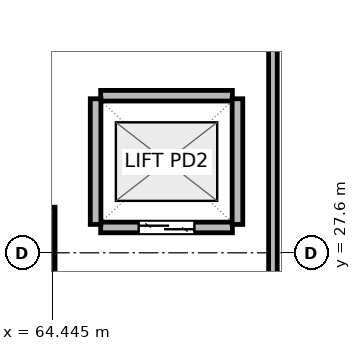
"""IFC4 building model, lengths in metres.
Left out: names, types, materials, properties, quantities, classifications, styles, units other than length and angle.
Written with IfcOpenShell. Run it as: python <this file> out.ifc"""

import sys

from ifc_helpers import new_model, si_unit, direction, frame, frame_2d, origin, origin_2d, place, context, subcontext, project, spatial, rectangle, extrude, element, fill, save


model = new_model("IFC4")
c1 = context("Model", 3, precision=1e-05, world=origin(), true_north=direction((0.0, 1.0)))
c2 = subcontext(c1, "Body", "Model", "MODEL_VIEW")
j1 = project(units=[si_unit("LENGTHUNIT", "METRE"), si_unit("PLANEANGLEUNIT", "RADIAN")], contexts=[c1])
p1 = place(None, origin())
s1 = spatial("IfcSite", under=j1, at=p1, CompositionType="ELEMENT")
p2 = place(p1, origin())
s2 = spatial("IfcBuilding", under=s1, at=p2, CompositionType="ELEMENT")
p3 = place(p2, frame((0.0, 0.0, 12.9)))
s3 = spatial("IfcBuildingStorey", under=s2, at=p3, CompositionType="ELEMENT", Elevation=12.9)
p4 = place(p3, frame((63.6, 27.6, 0.0), z_axis=(0.0, 0.0, 1.0), x_axis=(1.0, 0.0, 0.0)))
e1 = element("IfcColumn", 1, at=p4, inside=s3, PredefinedType="COLUMN", context=c2, shape_type="SweptSolid", body=[
    extrude(rectangle(XDim=1.8, YDim=1.8, at=origin_2d()), origin(), (0.0, 0.0, 1.0), 4.2),
])
p5 = place(p3, frame((65.4, 28.1, 0.0), z_axis=(0.0, 0.0, 1.0), x_axis=(1.0, 0.0, 0.0)))
e2 = element("IfcWall", 2, at=p5, inside=s3, PredefinedType="PARTITIONING", context=c2, shape_type="SweptSolid", body=[
    extrude(rectangle(XDim=2.6, YDim=0.21, at=frame_2d((1.3, 0.0))), origin(), (0.0, 0.0, 1.0), 3.84),
])
p6 = place(p5, frame((0.75, 0.0, 0.0)))
e3 = element("IfcOpeningElement", 3, at=p6, cuts=e2, PredefinedType="OPENING", context=c2, shape_type="SweptSolid", body=[
    extrude(rectangle(XDim=1.1, YDim=2.04, at=frame_2d((0.55, 1.02))), frame((0.0, 0.115, 0.0), z_axis=(0.0, -1.0, 0.0), x_axis=(1.0, 0.0, 0.0)), (0.0, 0.0, 1.0), 0.23),
])
p7 = place(p3, frame((65.4, 30.7, 0.0), z_axis=(0.0, 0.0, 1.0), x_axis=(1.0, 0.0, 0.0)))
e4 = element("IfcWall", 4, at=p7, inside=s3, PredefinedType="PARTITIONING", context=c2, shape_type="SweptSolid", body=[
    extrude(rectangle(XDim=2.6, YDim=0.21, at=frame_2d((1.3, 0.0))), origin(), (0.0, 0.0, 1.0), 3.84),
])
for number, where, z_axis, x_axis in (
    (5, (65.3, 28.16, 0.0), (0.0, 0.0, 1.0), (0.0, 1.0, 0.0)),
    (6, (68.1, 28.16, 0.0), (0.0, 0.0, 1.0), (0.0, 1.0, 0.0)),
):
    element("IfcWall", number, at=place(p3, frame(where, z_axis=z_axis, x_axis=x_axis)), inside=s3, PredefinedType="PARTITIONING", context=c2, shape_type="SweptSolid", body=[
        extrude(rectangle(XDim=2.48, YDim=0.21, at=frame_2d((1.24, 0.0))), origin(), (0.0, 0.0, 1.0), 3.84),
    ])
p8 = place(p3, frame((68.8, 25.187, 0.0), z_axis=(0.0, 0.0, 1.0), x_axis=(0.0, 1.0, 0.0)))
e7 = element("IfcWall", 7, at=p8, inside=s3, PredefinedType="PARTITIONING", context=c2, shape_type="SweptSolid", body=[
    extrude(rectangle(XDim=46.448, YDim=0.17, at=frame_2d((23.224, 0.0))), origin(), (0.0, 0.0, 1.0), 3.84),
])
p9 = place(p8, frame((15.913, 0.0, 0.0)))
e8 = element("IfcOpeningElement", 8, at=p9, cuts=e7, PredefinedType="OPENING", context=c2, shape_type="SweptSolid", body=[
    extrude(rectangle(XDim=1.1, YDim=2.05, at=frame_2d((0.55, 1.025))), frame((0.0, 0.095, 0.0), z_axis=(0.0, -1.0, 0.0), x_axis=(1.0, 0.0, 0.0)), (0.0, 0.0, 1.0), 0.19),
])
p10 = place(p6, origin())
e9 = element("IfcDoor", 9, at=p10, inside=s3, OperationType="DOUBLE_DOOR_SLIDING", PredefinedType="DOOR", context=c2, shape_type="SweptSolid", body=[
    extrude(rectangle(XDim=1.1, YDim=2.04, at=frame_2d((0.55, 1.02))), frame((0.0, 0.025, 0.0), z_axis=(0.0, -1.0, 0.0), x_axis=(1.0, 0.0, 0.0)), (0.0, 0.0, 1.0), 0.05),
])
fill(e3, e9)
save(model, sys.argv[1])
